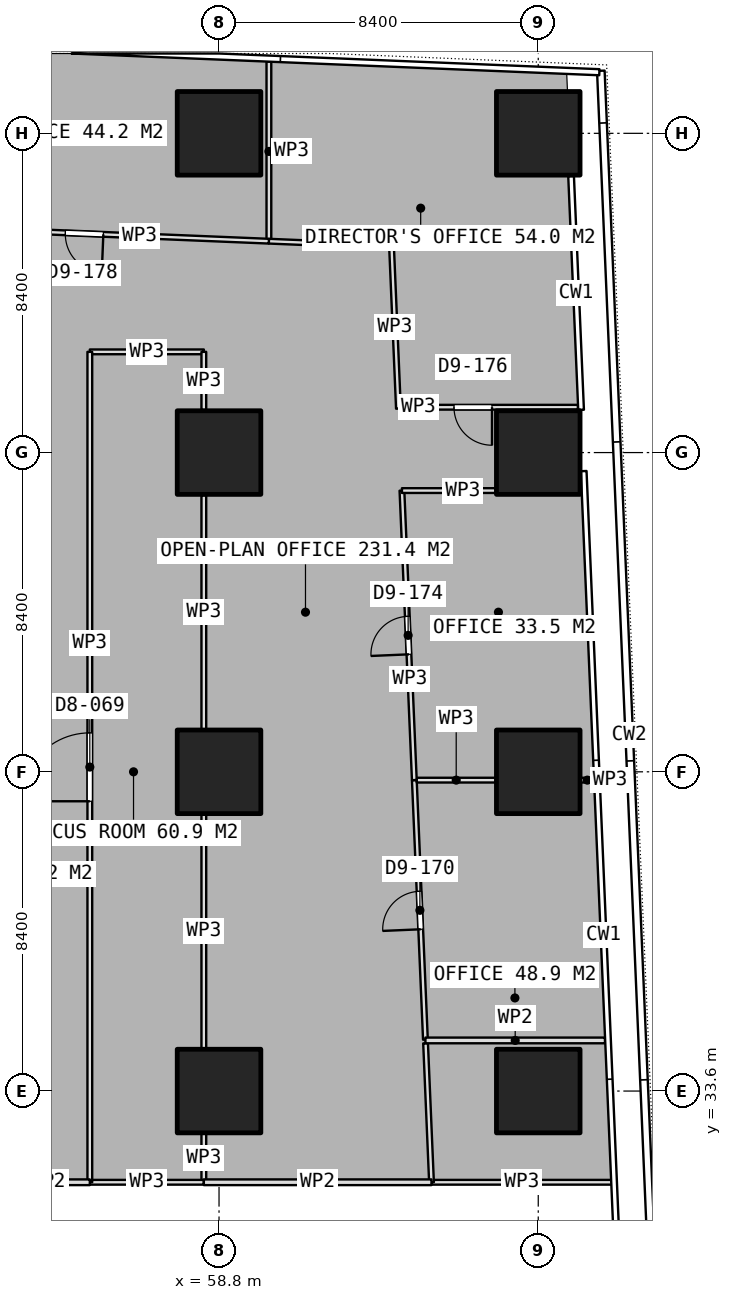
"""IFC4 building model, lengths in metres.
Left out: names, types, materials, properties, quantities, classifications, styles, units other than length and angle.
Written with IfcOpenShell. Run it as: python <this file> out.ifc"""

import sys

from ifc_helpers import new_model, si_unit, direction, frame, frame_2d, origin, origin_2d, place, context, subcontext, project, spatial, rectangle, extrude, element, fill, save


model = new_model("IFC4")
c1 = context("Model", 3, precision=1e-05, world=origin(), true_north=direction((0.0, 1.0)))
c2 = subcontext(c1, "Body", "Model", "MODEL_VIEW")
j1 = project(units=[si_unit("LENGTHUNIT", "METRE"), si_unit("PLANEANGLEUNIT", "RADIAN")], contexts=[c1])
p1 = place(None, origin())
s1 = spatial("IfcSite", under=j1, at=p1, CompositionType="ELEMENT")
p2 = place(p1, origin())
s2 = spatial("IfcBuilding", under=s1, at=p2, CompositionType="ELEMENT")
p3 = place(p2, frame((0.0, 0.0, 55.4)))
s3 = spatial("IfcBuildingStorey", under=s2, at=p3, CompositionType="ELEMENT", Elevation=55.4)
for number, where, z_axis, x_axis in (
    (1, (58.8, 33.6, 0.0), (0.0, 0.0, 1.0), (1.0, 0.0, 0.0)),
    (2, (58.8, 42.0, 0.0), (0.0, 0.0, 1.0), (1.0, 0.0, 0.0)),
    (3, (58.8, 50.4, 0.0), (0.0, 0.0, 1.0), (1.0, 0.0, 0.0)),
    (4, (58.8, 58.8, 0.0), (0.0, 0.0, 1.0), (1.0, 0.0, 0.0)),
    (5, (67.2, 33.6, 0.0), (0.0, 0.0, 1.0), (1.0, 0.0, 0.0)),
    (6, (67.2, 42.0, 0.0), (0.0, 0.0, 1.0), (1.0, 0.0, 0.0)),
    (7, (67.2, 50.4, 0.0), (0.0, 0.0, 1.0), (1.0, 0.0, 0.0)),
    (8, (67.2, 58.8, 0.0), (0.0, 0.0, 1.0), (1.0, 0.0, 0.0)),
):
    element("IfcColumn", number, at=place(p3, frame(where, z_axis=z_axis, x_axis=x_axis)), inside=s3, PredefinedType="COLUMN", context=c2, shape_type="SweptSolid", body=[
        extrude(rectangle(XDim=2.2, YDim=2.2, at=origin_2d()), origin(), (0.0, 0.0, 1.0), 3.75),
    ])
p4 = place(p3, frame((69.145, 31.2, 0.0), z_axis=(0.0, 0.0, 1.0), x_axis=(-1.0, 0.0, 0.0)))
e9 = element("IfcWall", 9, at=p4, inside=s3, PredefinedType="PARTITIONING", context=c2, shape_type="SweptSolid", body=[
    extrude(rectangle(XDim=4.754, YDim=0.125, at=frame_2d((2.377, 0.0))), origin(), (0.0, 0.0, 1.0), 3.5),
])
p5 = place(p3, frame((64.391, 31.2, 0.0), z_axis=(0.0, 0.0, 1.0), x_axis=(-0.042620959322, 0.999091314058, 0.0)))
e10 = element("IfcWall", 10, at=p5, inside=s3, PredefinedType="PARTITIONING", context=c2, shape_type="SweptSolid", body=[
    extrude(rectangle(XDim=3.66, YDim=0.125, at=frame_2d((1.83, 0.0))), origin(), (0.0, 0.0, 1.0), 3.5),
])
p6 = place(p3, frame((64.231, 34.954, 0.0), z_axis=(0.0, 0.0, 1.0), x_axis=(-0.042731736662, 0.999086582175, 0.0)))
e11 = element("IfcWall", 11, at=p6, inside=s3, PredefinedType="PARTITIONING", context=c2, shape_type="SweptSolid", body=[
    extrude(rectangle(XDim=6.833, YDim=0.125, at=frame_2d((3.417, 0.0))), origin(), (0.0, 0.0, 1.0), 3.5),
])
p7 = place(p6, frame((2.905, 0.0, 0.0)))
e12 = element("IfcOpeningElement", 12, at=p7, cuts=e11, PredefinedType="OPENING", context=c2, shape_type="SweptSolid", body=[
    extrude(rectangle(XDim=1.0, YDim=2.1, at=frame_2d((0.5, 1.05))), frame((0.0, 0.073, 0.0), z_axis=(0.0, -1.0, 0.0), x_axis=(1.0, 0.0, 0.0)), (0.0, 0.0, 1.0), 0.145),
])
p8 = place(p3, frame((64.002, 41.781, 0.0), z_axis=(0.0, 0.0, 1.0), x_axis=(1.0, 0.0, 0.0)))
e13 = element("IfcWall", 13, at=p8, inside=s3, PredefinedType="PARTITIONING", context=c2, shape_type="SweptSolid", body=[
    extrude(rectangle(XDim=2.078, YDim=0.125, at=frame_2d((1.039, 0.0))), origin(), (0.0, 0.0, 1.0), 3.5),
])
p9 = place(p3, frame((68.32, 41.781, 0.0), z_axis=(0.0, 0.0, 1.0), x_axis=(1.0, 0.0, 0.0)))
e14 = element("IfcWall", 14, at=p9, inside=s3, PredefinedType="PARTITIONING", context=c2, shape_type="SweptSolid", body=[
    extrude(rectangle(XDim=0.343, YDim=0.125, at=frame_2d((0.171, 0.0))), origin(), (0.0, 0.0, 1.0), 3.5),
])
p10 = place(p3, frame((63.939, 41.782, 0.0), z_axis=(0.0, 0.0, 1.0), x_axis=(-0.042745242954, 0.999086004408, 0.0)))
e15 = element("IfcWall", 15, at=p10, inside=s3, PredefinedType="PARTITIONING", context=c2, shape_type="SweptSolid", body=[
    extrude(rectangle(XDim=7.625, YDim=0.125, at=frame_2d((3.812, 0.0))), origin(), (0.0, 0.0, 1.0), 3.5),
])
p11 = place(p10, frame((3.312, 0.0, 0.0)))
e16 = element("IfcOpeningElement", 16, at=p11, cuts=e15, PredefinedType="OPENING", context=c2, shape_type="SweptSolid", body=[
    extrude(rectangle(XDim=1.0, YDim=2.1, at=frame_2d((0.5, 1.05))), frame((0.0, 0.073, 0.0), z_axis=(0.0, -1.0, 0.0), x_axis=(1.0, 0.0, 0.0)), (0.0, 0.0, 1.0), 0.145),
])
p12 = place(p3, frame((63.613, 49.4, 0.0), z_axis=(0.0, 0.0, 1.0), x_axis=(1.0, 0.0, 0.0)))
e17 = element("IfcWall", 17, at=p12, inside=s3, PredefinedType="PARTITIONING", context=c2, shape_type="SweptSolid", body=[
    extrude(rectangle(XDim=2.467, YDim=0.125, at=frame_2d((1.233, 0.0))), origin(), (0.0, 0.0, 1.0), 3.5),
])
p13 = place(p3, frame((60.112, 55.962, 0.0), z_axis=(0.0, 0.0, 1.0), x_axis=(0.0, 1.0, 0.0)))
e18 = element("IfcWall", 18, at=p13, inside=s3, PredefinedType="PARTITIONING", context=c2, shape_type="SweptSolid", body=[
    extrude(rectangle(XDim=4.724, YDim=0.125, at=frame_2d((2.362, 0.0))), origin(), (0.0, 0.0, 1.0), 3.5),
])
p14 = place(p3, frame((68.244, 51.593, 0.0), z_axis=(0.0, 0.0, 1.0), x_axis=(-1.0, 0.0, 0.0)))
e19 = element("IfcWall", 19, at=p14, inside=s3, PredefinedType="PARTITIONING", context=c2, shape_type="SweptSolid", body=[
    extrude(rectangle(XDim=4.662, YDim=0.125, at=frame_2d((2.331, 0.0))), origin(), (0.0, 0.0, 1.0), 3.5),
])
p15 = place(p14, frame((2.261, 0.0, 0.0)))
e20 = element("IfcOpeningElement", 20, at=p15, cuts=e19, PredefinedType="OPENING", context=c2, shape_type="SweptSolid", body=[
    extrude(rectangle(XDim=1.0, YDim=2.1, at=frame_2d((0.5, 1.05))), frame((0.0, 0.073, 0.0), z_axis=(0.0, -1.0, 0.0), x_axis=(1.0, 0.0, 0.0)), (0.0, 0.0, 1.0), 0.145),
])
p16 = place(p3, frame((63.521, 51.557, 0.0), z_axis=(0.0, 0.0, 1.0), x_axis=(-0.042535330456, 0.999094963286, 0.0)))
e21 = element("IfcWall", 21, at=p16, inside=s3, PredefinedType="PARTITIONING", context=c2, shape_type="SweptSolid", body=[
    extrude(rectangle(XDim=4.276, YDim=0.125, at=frame_2d((2.138, 0.0))), origin(), (0.0, 0.0, 1.0), 3.5),
])
p17 = place(p3, frame((63.339, 55.829, 0.0), z_axis=(0.0, 0.0, 1.0), x_axis=(-0.999154166221, 0.04112118826, 0.0)))
e22 = element("IfcWall", 22, at=p17, inside=s3, PredefinedType="PARTITIONING", context=c2, shape_type="SweptSolid", body=[
    extrude(rectangle(XDim=3.23, YDim=0.125, at=frame_2d((1.615, 0.0))), origin(), (0.0, 0.0, 1.0), 3.5),
])
p18 = place(p3, frame((60.111, 55.962, 0.0), z_axis=(0.0, 0.0, 1.0), x_axis=(-0.999151781827, 0.041179082941, 0.0)))
e23 = element("IfcWall", 23, at=p18, inside=s3, PredefinedType="PARTITIONING", context=c2, shape_type="SweptSolid", body=[
    extrude(rectangle(XDim=9.717, YDim=0.125, at=frame_2d((4.859, 0.0))), origin(), (0.0, 0.0, 1.0), 3.5),
])
p19 = place(p18, frame((4.359, 0.0, 0.0)))
e24 = element("IfcOpeningElement", 24, at=p19, cuts=e23, PredefinedType="OPENING", context=c2, shape_type="SweptSolid", body=[
    extrude(rectangle(XDim=1.0, YDim=2.1, at=frame_2d((0.5, 1.05))), frame((0.0, 0.073, 0.0), z_axis=(0.0, -1.0, 0.0), x_axis=(1.0, 0.0, 0.0)), (0.0, 0.0, 1.0), 0.145),
])
p20 = place(p3, frame((55.4, 53.05, 0.0), z_axis=(0.0, 0.0, 1.0), x_axis=(1.0, 0.0, 0.0)))
e25 = element("IfcWall", 25, at=p20, inside=s3, PredefinedType="PARTITIONING", context=c2, shape_type="SweptSolid", body=[
    extrude(rectangle(XDim=3.0, YDim=0.125, at=frame_2d((1.5, 0.0))), origin(), (0.0, 0.0, 1.0), 3.5),
])
p21 = place(p3, frame((58.4, 53.05, 0.0), z_axis=(0.0, 0.0, 1.0), x_axis=(0.0, -1.0, 0.0)))
e26 = element("IfcWall", 26, at=p21, inside=s3, PredefinedType="PARTITIONING", context=c2, shape_type="SweptSolid", body=[
    extrude(rectangle(XDim=1.53, YDim=0.125, at=frame_2d((0.765, 0.0))), origin(), (0.0, 0.0, 1.0), 3.5),
])
for number, where, z_axis, x_axis in (
    (27, (58.4, 49.28, 0.0), (0.0, 0.0, 1.0), (0.0, -1.0, 0.0)),
    (28, (58.4, 40.88, 0.0), (0.0, 0.0, 1.0), (0.0, -1.0, 0.0)),
):
    element("IfcWall", number, at=place(p3, frame(where, z_axis=z_axis, x_axis=x_axis)), inside=s3, PredefinedType="PARTITIONING", context=c2, shape_type="SweptSolid", body=[
        extrude(rectangle(XDim=6.16, YDim=0.125, at=frame_2d((3.08, 0.0))), origin(), (0.0, 0.0, 1.0), 3.5),
    ])
p22 = place(p3, frame((58.4, 32.48, 0.0), z_axis=(0.0, 0.0, 1.0), x_axis=(0.0, -1.0, 0.0)))
e29 = element("IfcWall", 29, at=p22, inside=s3, PredefinedType="PARTITIONING", context=c2, shape_type="SweptSolid", body=[
    extrude(rectangle(XDim=1.28, YDim=0.125, at=frame_2d((0.64, 0.0))), origin(), (0.0, 0.0, 1.0), 3.5),
])
p23 = place(p3, frame((58.4, 31.2, 0.0), z_axis=(0.0, 0.0, 1.0), x_axis=(-1.0, 0.0, 0.0)))
e30 = element("IfcWall", 30, at=p23, inside=s3, PredefinedType="PARTITIONING", context=c2, shape_type="SweptSolid", body=[
    extrude(rectangle(XDim=3.0, YDim=0.125, at=frame_2d((1.5, 0.0))), origin(), (0.0, 0.0, 1.0), 3.5),
])
p24 = place(p3, frame((55.4, 31.2, 0.0), z_axis=(0.0, 0.0, 1.0), x_axis=(0.0, 1.0, 0.0)))
e31 = element("IfcWall", 31, at=p24, inside=s3, PredefinedType="PARTITIONING", context=c2, shape_type="SweptSolid", body=[
    extrude(rectangle(XDim=21.85, YDim=0.125, at=frame_2d((10.925, 0.0))), origin(), (0.0, 0.0, 1.0), 3.5),
])
p25 = place(p24, frame((10.025, 0.0, 0.0)))
e32 = element("IfcOpeningElement", 32, at=p25, cuts=e31, PredefinedType="OPENING", context=c2, shape_type="SweptSolid", body=[
    extrude(rectangle(XDim=1.8, YDim=2.1, at=frame_2d((0.9, 1.05))), frame((0.0, 0.073, 0.0), z_axis=(0.0, -1.0, 0.0), x_axis=(1.0, 0.0, 0.0)), (0.0, 0.0, 1.0), 0.145),
])
p26 = place(p3, frame((64.231, 34.932, 0.0), z_axis=(0.0, 0.0, 1.0), x_axis=(1.0, 0.0, 0.0)))
e33 = element("IfcWall", 33, at=p26, inside=s3, PredefinedType="PARTITIONING", context=c2, shape_type="SweptSolid", body=[
    extrude(rectangle(XDim=4.725, YDim=0.15, at=frame_2d((2.363, 0.0))), origin(), (0.0, 0.0, 1.0), 3.5),
])
p27 = place(p3, frame((64.391, 31.2, 0.0), z_axis=(0.0, 0.0, 1.0), x_axis=(-1.0, 0.0, 0.0)))
e34 = element("IfcWall", 34, at=p27, inside=s3, PredefinedType="PARTITIONING", context=c2, shape_type="SweptSolid", body=[
    extrude(rectangle(XDim=5.991, YDim=0.15, at=frame_2d((2.996, 0.0))), origin(), (0.0, 0.0, 1.0), 3.5),
])
p28 = place(p3, frame((55.4, 31.2, 0.0), z_axis=(0.0, 0.0, 1.0), x_axis=(-1.0, 0.0, 0.0)))
e35 = element("IfcWall", 35, at=p28, inside=s3, PredefinedType="PARTITIONING", context=c2, shape_type="SweptSolid", body=[
    extrude(rectangle(XDim=2.2, YDim=0.15, at=frame_2d((1.1, 0.0))), origin(), (0.0, 0.0, 1.0), 3.5),
])
p29 = place(p7, origin())
e36 = element("IfcDoor", 36, at=p29, inside=s3, OperationType="SINGLE_SWING_LEFT", PredefinedType="DOOR", context=c2, shape_type="SweptSolid", body=[
    extrude(rectangle(XDim=1.0, YDim=2.1, at=frame_2d((0.5, 1.05))), frame((0.0, 0.025, 0.0), z_axis=(0.0, -1.0, 0.0), x_axis=(1.0, 0.0, 0.0)), (0.0, 0.0, 1.0), 0.05),
])
fill(e12, e36)
p30 = place(p11, origin())
e37 = element("IfcDoor", 37, at=p30, inside=s3, OperationType="SINGLE_SWING_LEFT", PredefinedType="DOOR", context=c2, shape_type="SweptSolid", body=[
    extrude(rectangle(XDim=1.0, YDim=2.1, at=frame_2d((0.5, 1.05))), frame((0.0, 0.025, 0.0), z_axis=(0.0, -1.0, 0.0), x_axis=(1.0, 0.0, 0.0)), (0.0, 0.0, 1.0), 0.05),
])
fill(e16, e37)
p31 = place(p15, origin())
e38 = element("IfcDoor", 38, at=p31, inside=s3, OperationType="SINGLE_SWING_LEFT", PredefinedType="DOOR", context=c2, shape_type="SweptSolid", body=[
    extrude(rectangle(XDim=1.0, YDim=2.1, at=frame_2d((0.5, 1.05))), frame((0.0, 0.025, 0.0), z_axis=(0.0, -1.0, 0.0), x_axis=(1.0, 0.0, 0.0)), (0.0, 0.0, 1.0), 0.05),
])
fill(e20, e38)
p32 = place(p19, origin())
e39 = element("IfcDoor", 39, at=p32, inside=s3, OperationType="SINGLE_SWING_LEFT", PredefinedType="DOOR", context=c2, shape_type="SweptSolid", body=[
    extrude(rectangle(XDim=1.0, YDim=2.1, at=frame_2d((0.5, 1.05))), frame((0.0, 0.025, 0.0), z_axis=(0.0, -1.0, 0.0), x_axis=(1.0, 0.0, 0.0)), (0.0, 0.0, 1.0), 0.05),
])
fill(e24, e39)
p33 = place(p25, origin())
e40 = element("IfcDoor", 40, at=p33, inside=s3, OperationType="DOUBLE_DOOR_SINGLE_SWING", PredefinedType="DOOR", context=c2, shape_type="SweptSolid", body=[
    extrude(rectangle(XDim=1.8, YDim=2.1, at=frame_2d((0.9, 1.05))), frame((0.0, 0.025, 0.0), z_axis=(0.0, -1.0, 0.0), x_axis=(1.0, 0.0, 0.0)), (0.0, 0.0, 1.0), 0.05),
])
fill(e32, e40)
save(model, sys.argv[1])
